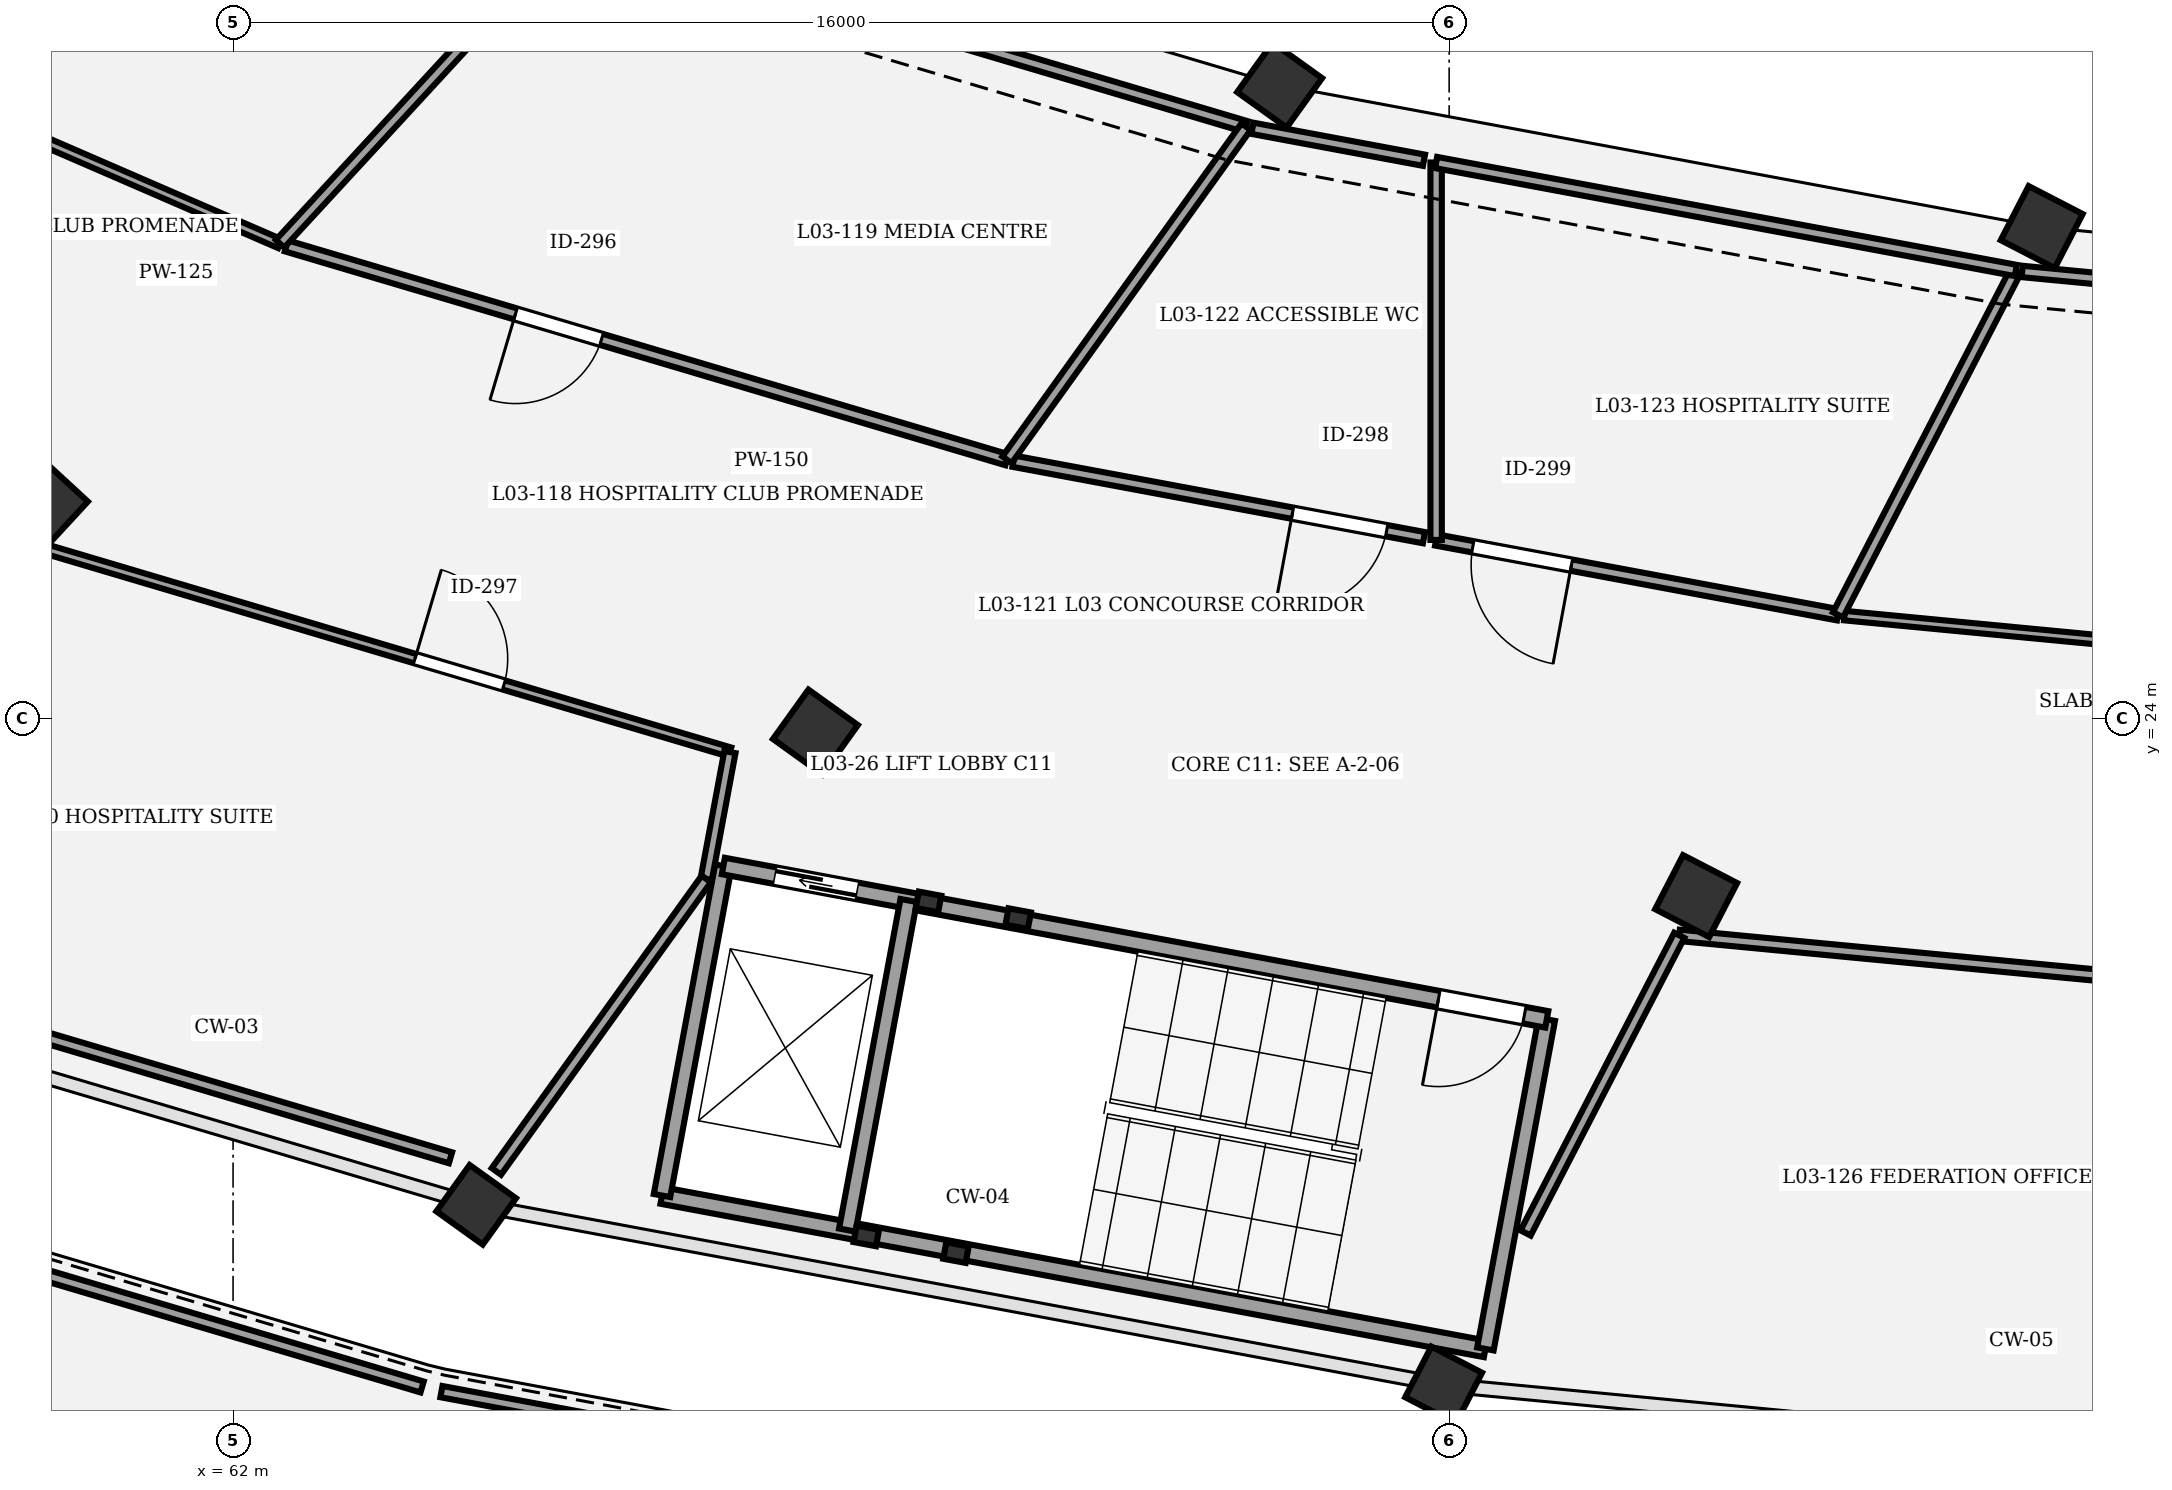
"""IFC4 building model, lengths in metres.
Left out: names, types, materials, properties, quantities, classifications, styles, units other than length and angle.
Written with IfcOpenShell. Run it as: python <this file> out.ifc"""

import sys

from ifc_helpers import new_model, si_unit, direction, frame, frame_2d, origin, origin_2d, place, context, subcontext, project, spatial, rectangle, extrude, element, fill, save


model = new_model("IFC4")
c1 = context("Model", 3, precision=1e-05, world=origin(), true_north=direction((0.0, 1.0)))
c2 = subcontext(c1, "Body", "Model", "MODEL_VIEW")
j1 = project(units=[si_unit("LENGTHUNIT", "METRE"), si_unit("PLANEANGLEUNIT", "RADIAN")], contexts=[c1])
p1 = place(None, origin())
s1 = spatial("IfcSite", under=j1, at=p1, CompositionType="ELEMENT")
p2 = place(p1, origin())
s2 = spatial("IfcBuilding", under=s1, at=p2, CompositionType="ELEMENT")
p3 = place(p2, frame((0.0, 0.0, 14.7)))
s3 = spatial("IfcBuildingStorey", under=s2, at=p3, CompositionType="ELEMENT", Elevation=14.7)
p4 = place(p3, frame((59.524, 26.832, 0.0), z_axis=(0.0, 0.0, 1.0), x_axis=(-0.677903094969, -0.735151272753, 0.0)))
e1 = element("IfcColumn", 1, at=p4, inside=s3, PredefinedType="COLUMN", context=c2, shape_type="SweptSolid", body=[
    extrude(rectangle(XDim=0.8, YDim=0.8, at=origin_2d()), origin(), (0.0, 0.0, 1.0), 4.5),
])
p5 = place(p3, frame((75.77, 32.333, 0.0), z_axis=(0.0, 0.0, 1.0), x_axis=(-0.582974127943, -0.812490717577, 0.0)))
e2 = element("IfcColumn", 2, at=p5, inside=s3, PredefinedType="COLUMN", context=c2, shape_type="SweptSolid", body=[
    extrude(rectangle(XDim=0.8, YDim=0.8, at=origin_2d()), origin(), (0.0, 0.0, 1.0), 2.85),
])
p6 = place(p3, frame((69.662, 23.823, 0.0), z_axis=(0.0, 0.0, 1.0), x_axis=(-0.582974127943, -0.812490717577, 0.0)))
e3 = element("IfcColumn", 3, at=p6, inside=s3, PredefinedType="COLUMN", context=c2, shape_type="SweptSolid", body=[
    extrude(rectangle(XDim=0.8, YDim=0.8, at=origin_2d()), origin(), (0.0, 0.0, 1.0), 4.5),
])
p7 = place(p3, frame((65.199, 17.603, 0.0), z_axis=(0.0, 0.0, 1.0), x_axis=(-0.582974127943, -0.812490717577, 0.0)))
e4 = element("IfcColumn", 4, at=p7, inside=s3, PredefinedType="COLUMN", context=c2, shape_type="SweptSolid", body=[
    extrude(rectangle(XDim=0.75, YDim=0.75, at=origin_2d()), origin(), (0.0, 0.0, 1.0), 4.5),
])
p8 = place(p3, frame((85.796, 30.466, 0.0), z_axis=(0.0, 0.0, 1.0), x_axis=(-0.458959712465, -0.888457079624, 0.0)))
e5 = element("IfcColumn", 5, at=p8, inside=s3, PredefinedType="COLUMN", context=c2, shape_type="SweptSolid", body=[
    extrude(rectangle(XDim=0.8, YDim=0.8, at=origin_2d()), origin(), (0.0, 0.0, 1.0), 2.85),
])
p9 = place(p3, frame((81.25, 21.665, 0.0), z_axis=(0.0, 0.0, 1.0), x_axis=(-0.458959712465, -0.888457079624, 0.0)))
e6 = element("IfcColumn", 6, at=p9, inside=s3, PredefinedType="COLUMN", context=c2, shape_type="SweptSolid", body=[
    extrude(rectangle(XDim=0.8, YDim=0.8, at=origin_2d()), origin(), (0.0, 0.0, 1.0), 4.5),
])
p10 = place(p3, frame((77.927, 15.233, 0.0), z_axis=(0.0, 0.0, 1.0), x_axis=(-0.458959712465, -0.888457079624, 0.0)))
e7 = element("IfcColumn", 7, at=p10, inside=s3, PredefinedType="COLUMN", context=c2, shape_type="SweptSolid", body=[
    extrude(rectangle(XDim=0.75, YDim=0.75, at=origin_2d()), origin(), (0.0, 0.0, 1.0), 4.5),
])
for number, where, z_axis, x_axis in (
    (8, (72.33, 21.369, 0.0), (0.0, 0.0, 1.0), (-0.983, 0.183, 0.0)),
    (9, (71.15, 21.588, 0.0), (0.0, 0.0, 1.0), (-0.983, 0.183, 0.0)),
    (10, (70.332, 17.194, 0.0), (0.0, 0.0, 1.0), (-0.983, 0.183, 0.0)),
    (11, (71.511, 16.974, 0.0), (0.0, 0.0, 1.0), (-0.983, 0.183, 0.0)),
):
    element("IfcColumn", number, at=place(p3, frame(where, z_axis=z_axis, x_axis=x_axis)), inside=s3, PredefinedType="COLUMN", context=c2, shape_type="SweptSolid", body=[
        extrude(rectangle(XDim=0.3, YDim=0.22, at=origin_2d()), origin(), (0.0, 0.0, 1.0), 4.5),
    ])
p11 = place(p3, frame((78.477, 15.707, 0.0), z_axis=(0.0, 0.0, 1.0), x_axis=(-0.983093434234, 0.183104613723, 0.0)))
e12 = element("IfcWall", 12, at=p11, inside=s3, PredefinedType="SHEAR", context=c2, shape_type="SweptSolid", body=[
    extrude(rectangle(XDim=11.02, YDim=0.22, at=frame_2d((5.51, 0.0))), origin(), (0.0, 0.0, 1.0), 4.25),
])
for number, where, z_axis, x_axis in (
    (13, (79.285, 20.043, 0.0), (0.0, 0.0, 1.0), (-0.183, -0.983, 0.0)),
    (14, (68.451, 22.061, 0.0), (0.0, 0.0, 1.0), (-0.183, -0.983, 0.0)),
):
    element("IfcWall", number, at=place(p3, frame(where, z_axis=z_axis, x_axis=x_axis)), inside=s3, PredefinedType="SHEAR", context=c2, shape_type="SweptSolid", body=[
        extrude(rectangle(XDim=4.41, YDim=0.22, at=frame_2d((2.205, 0.0))), origin(), (0.0, 0.0, 1.0), 4.25),
    ])
p12 = place(p3, frame((79.285, 20.043, 0.0), z_axis=(0.0, 0.0, 1.0), x_axis=(-0.983093434234, 0.183104613723, 0.0)))
e15 = element("IfcWall", 15, at=p12, inside=s3, PredefinedType="SHEAR", context=c2, shape_type="SweptSolid", body=[
    extrude(rectangle(XDim=11.02, YDim=0.22, at=frame_2d((5.51, 0.0))), origin(), (0.0, 0.0, 1.0), 4.25),
])
p13 = place(p12, frame((0.3, 0.0, 0.0)))
e16 = element("IfcOpeningElement", 16, at=p13, cuts=e15, PredefinedType="OPENING", context=c2, shape_type="SweptSolid", body=[
    extrude(rectangle(XDim=1.15, YDim=2.15, at=frame_2d((0.575, 1.075))), frame((0.0, 0.12, 0.0), z_axis=(0.0, -1.0, 0.0), x_axis=(1.0, 0.0, 0.0)), (0.0, 0.0, 1.0), 0.24),
])
p14 = place(p12, frame((9.23, 0.0, 0.0)))
e17 = element("IfcOpeningElement", 17, at=p14, cuts=e15, PredefinedType="OPENING", context=c2, shape_type="SweptSolid", body=[
    extrude(rectangle(XDim=1.1, YDim=2.15, at=frame_2d((0.55, 1.075))), frame((0.0, 0.12, 0.0), z_axis=(0.0, -1.0, 0.0), x_axis=(1.0, 0.0, 0.0)), (0.0, 0.0, 1.0), 0.24),
])
p15 = place(p3, frame((70.889, 21.606, 0.0), z_axis=(0.0, 0.0, 1.0), x_axis=(-0.183078394814, -0.983098317236, 0.0)))
e18 = element("IfcWall", 18, at=p15, inside=s3, PredefinedType="SHEAR", context=c2, shape_type="SweptSolid", body=[
    extrude(rectangle(XDim=4.41, YDim=0.22, at=frame_2d((2.205, 0.0))), origin(), (0.0, 0.0, 1.0), 4.25),
])
p16 = place(p3, frame((62.618, 30.247, 0.0), z_axis=(0.0, 0.0, 1.0), x_axis=(-0.917494590455, 0.397748257677, 0.0)))
e19 = element("IfcWall", 19, at=p16, inside=s3, PredefinedType="PARTITIONING", context=c2, shape_type="SweptSolid", body=[
    extrude(rectangle(XDim=9.049, YDim=0.125, at=frame_2d((4.525, 0.0))), origin(), (0.0, 0.0, 1.0), 3.25),
])
p17 = place(p16, frame((6.167, 0.0, 0.0)))
e20 = element("IfcOpeningElement", 20, at=p17, cuts=e19, PredefinedType="OPENING", context=c2, shape_type="SweptSolid", body=[
    extrude(rectangle(XDim=1.1, YDim=2.1, at=frame_2d((0.55, 1.05))), frame((0.0, 0.073, 0.0), z_axis=(0.0, -1.0, 0.0), x_axis=(1.0, 0.0, 0.0)), (0.0, 0.0, 1.0), 0.145),
])
p18 = place(p3, frame((72.183, 27.404, 0.0), z_axis=(0.0, 0.0, 1.0), x_axis=(-0.958655809656, 0.284568161629, 0.0)))
e21 = element("IfcWall", 21, at=p18, inside=s3, PredefinedType="PARTITIONING", context=c2, shape_type="SweptSolid", body=[
    extrude(rectangle(XDim=9.891, YDim=0.15, at=frame_2d((4.946, 0.0))), origin(), (0.0, 0.0, 1.0), 3.25),
])
p19 = place(p18, frame((5.566, 0.0, 0.0)))
e22 = element("IfcOpeningElement", 22, at=p19, cuts=e21, PredefinedType="OPENING", context=c2, shape_type="SweptSolid", body=[
    extrude(rectangle(XDim=1.18, YDim=2.1, at=frame_2d((0.59, 1.05))), frame((0.0, 0.085, 0.0), z_axis=(0.0, -1.0, 0.0), x_axis=(1.0, 0.0, 0.0)), (0.0, 0.0, 1.0), 0.17),
])
p20 = place(p3, frame((59.134, 26.35, 0.0), z_axis=(0.0, 0.0, 1.0), x_axis=(0.958661401763, -0.284549322211, 0.0)))
e23 = element("IfcWall", 23, at=p20, inside=s3, PredefinedType="PARTITIONING", context=c2, shape_type="SweptSolid", body=[
    extrude(rectangle(XDim=9.809, YDim=0.125, at=frame_2d((4.904, 0.0))), origin(), (0.0, 0.0, 1.0), 3.25),
])
p21 = place(p20, frame((5.487, 0.0, 0.0)))
e24 = element("IfcOpeningElement", 24, at=p21, cuts=e23, PredefinedType="OPENING", context=c2, shape_type="SweptSolid", body=[
    extrude(rectangle(XDim=1.22, YDim=2.1, at=frame_2d((0.61, 1.05))), frame((0.0, 0.073, 0.0), z_axis=(0.0, -1.0, 0.0), x_axis=(1.0, 0.0, 0.0)), (0.0, 0.0, 1.0), 0.145),
])
p22 = place(p3, frame((77.669, 26.38, 0.0), z_axis=(0.0, 0.0, 1.0), x_axis=(-0.983092857309, 0.183107711217, 0.0)))
e25 = element("IfcWall", 25, at=p22, inside=s3, PredefinedType="PARTITIONING", context=c2, shape_type="SweptSolid", body=[
    extrude(rectangle(XDim=5.493, YDim=0.15, at=frame_2d((2.747, 0.0))), origin(), (0.0, 0.0, 1.0), 3.25),
])
p23 = place(p22, frame((0.5, 0.0, 0.0)))
e26 = element("IfcOpeningElement", 26, at=p23, cuts=e25, PredefinedType="OPENING", context=c2, shape_type="SweptSolid", body=[
    extrude(rectangle(XDim=1.26, YDim=2.1, at=frame_2d((0.63, 1.05))), frame((0.0, 0.085, 0.0), z_axis=(0.0, -1.0, 0.0), x_axis=(1.0, 0.0, 0.0)), (0.0, 0.0, 1.0), 0.17),
])
p24 = place(p3, frame((83.116, 25.365, 0.0), z_axis=(0.0, 0.0, 1.0), x_axis=(-0.983102134935, 0.183057893263, 0.0)))
e27 = element("IfcWall", 27, at=p24, inside=s3, PredefinedType="PARTITIONING", context=c2, shape_type="SweptSolid", body=[
    extrude(rectangle(XDim=5.379, YDim=0.15, at=frame_2d((2.689, 0.0))), origin(), (0.0, 0.0, 1.0), 3.25),
])
p25 = place(p24, frame((3.568, 0.0, 0.0)))
e28 = element("IfcOpeningElement", 28, at=p25, cuts=e27, PredefinedType="OPENING", context=c2, shape_type="SweptSolid", body=[
    extrude(rectangle(XDim=1.32, YDim=2.1, at=frame_2d((0.66, 1.05))), frame((0.0, 0.085, 0.0), z_axis=(0.0, -1.0, 0.0), x_axis=(1.0, 0.0, 0.0)), (0.0, 0.0, 1.0), 0.17),
])
p26 = place(p3, frame((95.965, 24.138, 0.0), z_axis=(0.0, 0.0, 1.0), x_axis=(-0.995485111947, 0.094917816515, 0.0)))
e29 = element("IfcWall", 29, at=p26, inside=s3, PredefinedType="PARTITIONING", context=c2, shape_type="SweptSolid", body=[
    extrude(rectangle(XDim=12.822, YDim=0.125, at=frame_2d((6.411, 0.0))), origin(), (0.0, 0.0, 1.0), 3.25),
])
p27 = place(p26, frame((5.711, 0.0, 0.0)))
e30 = element("IfcOpeningElement", 30, at=p27, cuts=e29, PredefinedType="OPENING", context=c2, shape_type="SweptSolid", body=[
    extrude(rectangle(XDim=1.4, YDim=2.1, at=frame_2d((0.7, 1.05))), frame((0.0, 0.073, 0.0), z_axis=(0.0, -1.0, 0.0), x_axis=(1.0, 0.0, 0.0)), (0.0, 0.0, 1.0), 0.145),
])
p28 = place(p3, frame((81.028, 21.148, 0.0), z_axis=(0.0, 0.0, 1.0), x_axis=(0.995484535327, -0.094923863827, 0.0)))
e31 = element("IfcWall", 31, at=p28, inside=s3, PredefinedType="PARTITIONING", context=c2, shape_type="SweptSolid", body=[
    extrude(rectangle(XDim=13.351, YDim=0.15, at=frame_2d((6.676, 0.0))), origin(), (0.0, 0.0, 1.0), 3.25),
])
p29 = place(p28, frame((6.226, 0.0, 0.0)))
e32 = element("IfcOpeningElement", 32, at=p29, cuts=e31, PredefinedType="OPENING", context=c2, shape_type="SweptSolid", body=[
    extrude(rectangle(XDim=0.9, YDim=2.2, at=frame_2d((0.45, 1.1))), frame((0.0, 0.085, 0.0), z_axis=(0.0, -1.0, 0.0), x_axis=(1.0, 0.0, 0.0)), (0.0, 0.0, 1.0), 0.17),
])
p30 = place(p3, frame((66.47, 34.424, 0.0), z_axis=(0.0, 0.0, 1.0), x_axis=(-0.677867773629, -0.735183841958, 0.0)))
e33 = element("IfcWall", 33, at=p30, inside=s3, PredefinedType="PARTITIONING", context=c2, shape_type="SweptSolid", body=[
    extrude(rectangle(XDim=5.682, YDim=0.15, at=frame_2d((2.841, 0.0))), origin(), (0.0, 0.0, 1.0), 3.25),
])
p31 = place(p3, frame((66.55, 34.393, 0.0), z_axis=(0.0, 0.0, 1.0), x_axis=(0.958661639872, -0.284548520005, 0.0)))
e34 = element("IfcWall", 34, at=p31, inside=s3, PredefinedType="PARTITIONING", context=c2, shape_type="SweptSolid", body=[
    extrude(rectangle(XDim=9.157, YDim=0.15, at=frame_2d((4.579, 0.0))), origin(), (0.0, 0.0, 1.0), 3.25),
])
p32 = place(p3, frame((75.329, 31.788, 0.0), z_axis=(0.0, 0.0, 1.0), x_axis=(-0.582996203878, -0.812474877313, 0.0)))
e35 = element("IfcWall", 35, at=p32, inside=s3, PredefinedType="PARTITIONING", context=c2, shape_type="SweptSolid", body=[
    extrude(rectangle(XDim=5.395, YDim=0.15, at=frame_2d((2.698, 0.0))), origin(), (0.0, 0.0, 1.0), 3.25),
])
p33 = place(p3, frame((68.537, 23.559, 0.0), z_axis=(0.0, 0.0, 1.0), x_axis=(-0.183185863857, -0.983078297636, 0.0)))
e36 = element("IfcWall", 36, at=p33, inside=s3, PredefinedType="PARTITIONING", context=c2, shape_type="SweptSolid", body=[
    extrude(rectangle(XDim=1.698, YDim=0.15, at=frame_2d((0.849, 0.0))), origin(), (0.0, 0.0, 1.0), 3.25),
])
p34 = place(p3, frame((68.226, 21.89, 0.0), z_axis=(0.0, 0.0, 1.0), x_axis=(-0.583007019162, -0.812467116632, 0.0)))
e37 = element("IfcWall", 37, at=p34, inside=s3, PredefinedType="PARTITIONING", context=c2, shape_type="SweptSolid", body=[
    extrude(rectangle(XDim=4.736, YDim=0.15, at=frame_2d((2.368, 0.0))), origin(), (0.0, 0.0, 1.0), 3.25),
])
p35 = place(p3, frame((64.861, 18.222, 0.0), z_axis=(0.0, 0.0, 1.0), x_axis=(-0.958658110998, 0.284560408733, 0.0)))
e38 = element("IfcWall", 38, at=p35, inside=s3, PredefinedType="PARTITIONING", context=c2, shape_type="SweptSolid", body=[
    extrude(rectangle(XDim=10.828, YDim=0.15, at=frame_2d((5.414, 0.0))), origin(), (0.0, 0.0, 1.0), 3.25),
])
p36 = place(p3, frame((75.412, 31.766, 0.0), z_axis=(0.0, 0.0, 1.0), x_axis=(0.98309178423, -0.183113472412, 0.0)))
e39 = element("IfcWall", 39, at=p36, inside=s3, PredefinedType="PARTITIONING", context=c2, shape_type="SweptSolid", body=[
    extrude(rectangle(XDim=2.296, YDim=0.15, at=frame_2d((1.148, 0.0))), origin(), (0.0, 0.0, 1.0), 3.25),
])
p37 = place(p3, frame((85.456, 29.895, 0.0), z_axis=(0.0, 0.0, 1.0), x_axis=(-0.458955164524, -0.888459428987, 0.0)))
e40 = element("IfcWall", 40, at=p37, inside=s3, PredefinedType="PARTITIONING", context=c2, shape_type="SweptSolid", body=[
    extrude(rectangle(XDim=5.098, YDim=0.15, at=frame_2d((2.549, 0.0))), origin(), (0.0, 0.0, 1.0), 3.25),
])
p38 = place(p3, frame((77.829, 26.35, 0.0), z_axis=(0.0, 0.0, 1.0), x_axis=(0.0, 1.0, 0.0)))
e41 = element("IfcWall", 41, at=p38, inside=s3, PredefinedType="PARTITIONING", context=c2, shape_type="SweptSolid", body=[
    extrude(rectangle(XDim=4.966, YDim=0.15, at=frame_2d((2.483, 0.0))), origin(), (0.0, 0.0, 1.0), 3.25),
])
p39 = place(p3, frame((77.829, 31.316, 0.0), z_axis=(0.0, 0.0, 1.0), x_axis=(0.983094106907, -0.183101002083, 0.0)))
e42 = element("IfcWall", 42, at=p39, inside=s3, PredefinedType="PARTITIONING", context=c2, shape_type="SweptSolid", body=[
    extrude(rectangle(XDim=7.759, YDim=0.15, at=frame_2d((3.879, 0.0))), origin(), (0.0, 0.0, 1.0), 3.25),
])
p40 = place(p3, frame((85.54, 29.882, 0.0), z_axis=(0.0, 0.0, 1.0), x_axis=(0.995483914052, -0.094930379031, 0.0)))
e43 = element("IfcWall", 43, at=p40, inside=s3, PredefinedType="PARTITIONING", context=c2, shape_type="SweptSolid", body=[
    extrude(rectangle(XDim=11.874, YDim=0.15, at=frame_2d((5.937, 0.0))), origin(), (0.0, 0.0, 1.0), 3.25),
])
p41 = place(p3, frame((79.006, 17.233, 0.0), z_axis=(0.0, 0.0, 1.0), x_axis=(0.458942068402, 0.888466193983, 0.0)))
e44 = element("IfcWall", 44, at=p41, inside=s3, PredefinedType="PARTITIONING", context=c2, shape_type="SweptSolid", body=[
    extrude(rectangle(XDim=4.407, YDim=0.15, at=frame_2d((2.203, 0.0))), origin(), (0.0, 0.0, 1.0), 3.25),
])
p42 = place(p3, frame((64.741, 15.146, 0.0), z_axis=(0.0, 0.0, 1.0), x_axis=(0.983094545276, -0.183098648406, 0.0)))
e45 = element("IfcWall", 45, at=p42, inside=s3, PredefinedType="PARTITIONING", context=c2, shape_type="SweptSolid", body=[
    extrude(rectangle(XDim=12.947, YDim=0.15, at=frame_2d((6.474, 0.0))), origin(), (0.0, 0.0, 1.0), 3.25),
])
p43 = place(p3, frame((56.36, 17.619, 0.0), z_axis=(0.0, 0.0, 1.0), x_axis=(0.95866000112, -0.284554041006, 0.0)))
e46 = element("IfcWall", 46, at=p43, inside=s3, PredefinedType="PARTITIONING", context=c2, shape_type="SweptSolid", body=[
    extrude(rectangle(XDim=8.478, YDim=0.15, at=frame_2d((4.239, 0.0))), origin(), (0.0, 0.0, 1.0), 3.25),
])
p44 = place(p13, origin())
e47 = element("IfcDoor", 47, at=p44, inside=s3, OperationType="SINGLE_SWING_RIGHT", PredefinedType="DOOR", context=c2, shape_type="SweptSolid", body=[
    extrude(rectangle(XDim=1.15, YDim=2.15, at=frame_2d((0.575, 1.075))), frame((0.0, 0.025, 0.0), z_axis=(0.0, -1.0, 0.0), x_axis=(1.0, 0.0, 0.0)), (0.0, 0.0, 1.0), 0.05),
])
fill(e16, e47)
p45 = place(p14, origin())
e48 = element("IfcDoor", 48, at=p45, inside=s3, OperationType="DOUBLE_DOOR_SLIDING", PredefinedType="DOOR", context=c2, shape_type="SweptSolid", body=[
    extrude(rectangle(XDim=1.1, YDim=2.15, at=frame_2d((0.55, 1.075))), frame((0.0, 0.025, 0.0), z_axis=(0.0, -1.0, 0.0), x_axis=(1.0, 0.0, 0.0)), (0.0, 0.0, 1.0), 0.05),
])
fill(e17, e48)
p46 = place(p19, origin())
e49 = element("IfcDoor", 49, at=p46, inside=s3, OperationType="SINGLE_SWING_RIGHT", PredefinedType="DOOR", context=c2, shape_type="SweptSolid", body=[
    extrude(rectangle(XDim=1.18, YDim=2.1, at=frame_2d((0.59, 1.05))), frame((0.0, 0.025, 0.0), z_axis=(0.0, -1.0, 0.0), x_axis=(1.0, 0.0, 0.0)), (0.0, 0.0, 1.0), 0.05),
])
fill(e22, e49)
p47 = place(p21, origin())
e50 = element("IfcDoor", 50, at=p47, inside=s3, OperationType="SINGLE_SWING_LEFT", PredefinedType="DOOR", context=c2, shape_type="SweptSolid", body=[
    extrude(rectangle(XDim=1.22, YDim=2.1, at=frame_2d((0.61, 1.05))), frame((0.0, 0.025, 0.0), z_axis=(0.0, -1.0, 0.0), x_axis=(1.0, 0.0, 0.0)), (0.0, 0.0, 1.0), 0.05),
])
fill(e24, e50)
p48 = place(p23, origin())
e51 = element("IfcDoor", 51, at=p48, inside=s3, OperationType="SINGLE_SWING_RIGHT", PredefinedType="DOOR", context=c2, shape_type="SweptSolid", body=[
    extrude(rectangle(XDim=1.26, YDim=2.1, at=frame_2d((0.63, 1.05))), frame((0.0, 0.025, 0.0), z_axis=(0.0, -1.0, 0.0), x_axis=(1.0, 0.0, 0.0)), (0.0, 0.0, 1.0), 0.05),
])
fill(e26, e51)
p49 = place(p25, origin())
e52 = element("IfcDoor", 52, at=p49, inside=s3, OperationType="SINGLE_SWING_LEFT", PredefinedType="DOOR", context=c2, shape_type="SweptSolid", body=[
    extrude(rectangle(XDim=1.32, YDim=2.1, at=frame_2d((0.66, 1.05))), frame((0.0, 0.025, 0.0), z_axis=(0.0, -1.0, 0.0), x_axis=(1.0, 0.0, 0.0)), (0.0, 0.0, 1.0), 0.05),
])
fill(e28, e52)
save(model, sys.argv[1])
